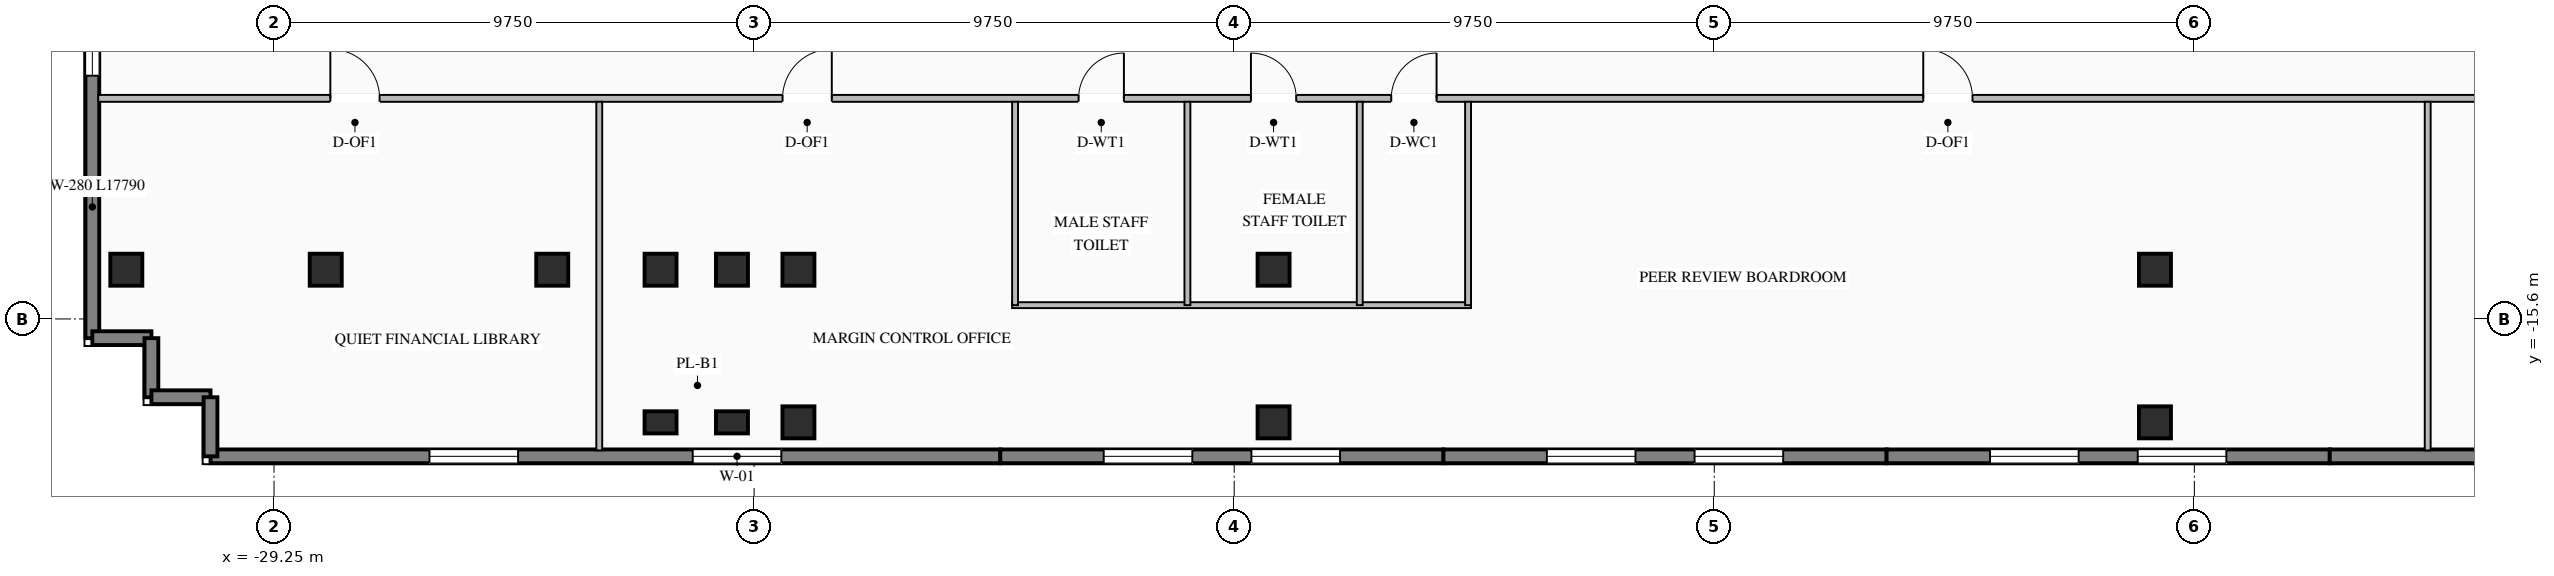
"""IFC4 building model, lengths in metres.
Left out: names, types, materials, properties, quantities, classifications, styles, units other than length and angle.
Written with IfcOpenShell. Run it as: python <this file> out.ifc"""

import sys

from ifc_helpers import new_model, si_unit, direction, frame, frame_2d, origin, origin_2d, place, context, subcontext, project, spatial, rectangle, i_section, extrude, element, fill, save


model = new_model("IFC4")
c1 = context("Model", 3, precision=1e-05, world=origin(), true_north=direction((0.0, 1.0)))
c2 = subcontext(c1, "Body", "Model", "MODEL_VIEW")
j1 = project(units=[si_unit("LENGTHUNIT", "METRE"), si_unit("PLANEANGLEUNIT", "RADIAN")], contexts=[c1])
p1 = place(None, origin())
s1 = spatial("IfcSite", under=j1, at=p1, CompositionType="ELEMENT")
p2 = place(p1, origin())
s2 = spatial("IfcBuilding", under=s1, at=p2, CompositionType="ELEMENT")
p3 = place(p2, frame((0.0, 0.0, 120.85)))
s3 = spatial("IfcBuildingStorey", under=s2, at=p3, CompositionType="ELEMENT", Elevation=120.85)
for number, where, z_axis, x_axis in (
    (1, (-21.4, -14.6, 0.0), (0.0, 0.0, 1.0), (1.0, 0.0, 0.0)),
    (2, (-19.95, -14.6, 0.0), (0.0, 0.0, 1.0), (1.0, 0.0, 0.0)),
    (3, (-18.6, -14.6, 0.0), (0.0, 0.0, 1.0), (1.0, 0.0, 0.0)),
    (4, (-8.95, -14.6, 0.0), (0.0, 0.0, 1.0), (1.0, 0.0, 0.0)),
    (5, (8.95, -14.6, 0.0), (0.0, 0.0, 1.0), (1.0, 0.0, 0.0)),
    (6, (-23.6, -14.6, 0.0), (0.0, 0.0, 1.0), (1.0, 0.0, 0.0)),
    (7, (-28.2, -14.6, 0.0), (0.0, 0.0, 1.0), (1.0, 0.0, 0.0)),
    (8, (-18.6, -17.7, 0.0), (0.0, 0.0, 1.0), (1.0, 0.0, 0.0)),
    (9, (-8.95, -17.7, 0.0), (0.0, 0.0, 1.0), (1.0, 0.0, 0.0)),
    (10, (8.95, -17.7, 0.0), (0.0, 0.0, 1.0), (1.0, 0.0, 0.0)),
    (11, (-32.25, -14.6, 0.0), (0.0, 0.0, 1.0), (1.0, 0.0, 0.0)),
):
    element("IfcColumn", number, at=place(p3, frame(where, z_axis=z_axis, x_axis=x_axis)), inside=s3, PredefinedType="COLUMN", context=c2, shape_type="SweptSolid", body=[
        extrude(i_section(OverallWidth=0.65, OverallDepth=0.65, WebThickness=0.028, FlangeThickness=0.04, at=origin_2d()), origin(), (0.0, 0.0, 1.0), 3.45),
    ])
for number, where, z_axis, x_axis in (
    (12, (-21.4, -17.7, 0.0), (0.0, 0.0, 1.0), (1.0, 0.0, 0.0)),
    (13, (-19.95, -17.7, 0.0), (0.0, 0.0, 1.0), (1.0, 0.0, 0.0)),
):
    element("IfcColumn", number, at=place(p3, frame(where, z_axis=z_axis, x_axis=x_axis)), inside=s3, PredefinedType="PILASTER", context=c2, shape_type="SweptSolid", body=[
        extrude(rectangle(XDim=0.65, YDim=0.45, at=origin_2d()), origin(), (0.0, 0.0, 1.0), 3.45),
    ])
p4 = place(p3, frame((-14.5, -18.39, 0.0), z_axis=(0.0, 0.0, 1.0), x_axis=(-1.0, 0.0, 0.0)))
e14 = element("IfcWall", 14, at=p4, inside=s3, PredefinedType="STANDARD", context=c2, shape_type="SweptSolid", body=[
    extrude(rectangle(XDim=16.04, YDim=0.28, at=frame_2d((8.02, 0.0))), origin(), (0.0, 0.0, 1.0), 3.25),
])
p5 = place(p4, frame((4.447, 0.0, 0.76)))
e15 = element("IfcOpeningElement", 15, at=p5, cuts=e14, PredefinedType="OPENING", context=c2, shape_type="SweptSolid", body=[
    extrude(rectangle(XDim=1.8, YDim=1.95, at=frame_2d((0.9, 0.975))), frame((0.0, 0.15, 0.0), z_axis=(0.0, -1.0, 0.0), x_axis=(1.0, 0.0, 0.0)), (0.0, 0.0, 1.0), 0.3),
])
p6 = place(p4, frame((9.793, 0.0, 0.76)))
e16 = element("IfcOpeningElement", 16, at=p6, cuts=e14, PredefinedType="OPENING", context=c2, shape_type="SweptSolid", body=[
    extrude(rectangle(XDim=1.8, YDim=1.95, at=frame_2d((0.9, 0.975))), frame((0.0, 0.15, 0.0), z_axis=(0.0, -1.0, 0.0), x_axis=(1.0, 0.0, 0.0)), (0.0, 0.0, 1.0), 0.3),
])
p7 = place(p3, frame((-5.5, -18.39, 0.0), z_axis=(0.0, 0.0, 1.0), x_axis=(-1.0, 0.0, 0.0)))
e17 = element("IfcWall", 17, at=p7, inside=s3, PredefinedType="STANDARD", context=c2, shape_type="SweptSolid", body=[
    extrude(rectangle(XDim=9.0, YDim=0.28, at=frame_2d((4.5, 0.0))), origin(), (0.0, 0.0, 1.0), 3.25),
])
p8 = place(p7, frame((2.1, 0.0, 0.76)))
e18 = element("IfcOpeningElement", 18, at=p8, cuts=e17, PredefinedType="OPENING", context=c2, shape_type="SweptSolid", body=[
    extrude(rectangle(XDim=1.8, YDim=1.95, at=frame_2d((0.9, 0.975))), frame((0.0, 0.15, 0.0), z_axis=(0.0, -1.0, 0.0), x_axis=(1.0, 0.0, 0.0)), (0.0, 0.0, 1.0), 0.3),
])
p9 = place(p7, frame((5.1, 0.0, 0.76)))
e19 = element("IfcOpeningElement", 19, at=p9, cuts=e17, PredefinedType="OPENING", context=c2, shape_type="SweptSolid", body=[
    extrude(rectangle(XDim=1.8, YDim=1.95, at=frame_2d((0.9, 0.975))), frame((0.0, 0.15, 0.0), z_axis=(0.0, -1.0, 0.0), x_axis=(1.0, 0.0, 0.0)), (0.0, 0.0, 1.0), 0.3),
])
p10 = place(p3, frame((3.5, -18.39, 0.0), z_axis=(0.0, 0.0, 1.0), x_axis=(-1.0, 0.0, 0.0)))
e20 = element("IfcWall", 20, at=p10, inside=s3, PredefinedType="STANDARD", context=c2, shape_type="SweptSolid", body=[
    extrude(rectangle(XDim=9.0, YDim=0.28, at=frame_2d((4.5, 0.0))), origin(), (0.0, 0.0, 1.0), 3.25),
])
p11 = place(p10, frame((2.1, 0.0, 0.76)))
e21 = element("IfcOpeningElement", 21, at=p11, cuts=e20, PredefinedType="OPENING", context=c2, shape_type="SweptSolid", body=[
    extrude(rectangle(XDim=1.8, YDim=1.95, at=frame_2d((0.9, 0.975))), frame((0.0, 0.15, 0.0), z_axis=(0.0, -1.0, 0.0), x_axis=(1.0, 0.0, 0.0)), (0.0, 0.0, 1.0), 0.3),
])
p12 = place(p10, frame((5.1, 0.0, 0.76)))
e22 = element("IfcOpeningElement", 22, at=p12, cuts=e20, PredefinedType="OPENING", context=c2, shape_type="SweptSolid", body=[
    extrude(rectangle(XDim=1.8, YDim=1.95, at=frame_2d((0.9, 0.975))), frame((0.0, 0.15, 0.0), z_axis=(0.0, -1.0, 0.0), x_axis=(1.0, 0.0, 0.0)), (0.0, 0.0, 1.0), 0.3),
])
p13 = place(p3, frame((12.5, -18.39, 0.0), z_axis=(0.0, 0.0, 1.0), x_axis=(-1.0, 0.0, 0.0)))
e23 = element("IfcWall", 23, at=p13, inside=s3, PredefinedType="STANDARD", context=c2, shape_type="SweptSolid", body=[
    extrude(rectangle(XDim=9.0, YDim=0.28, at=frame_2d((4.5, 0.0))), origin(), (0.0, 0.0, 1.0), 3.25),
])
p14 = place(p13, frame((2.1, 0.0, 0.76)))
e24 = element("IfcOpeningElement", 24, at=p14, cuts=e23, PredefinedType="OPENING", context=c2, shape_type="SweptSolid", body=[
    extrude(rectangle(XDim=1.8, YDim=1.95, at=frame_2d((0.9, 0.975))), frame((0.0, 0.15, 0.0), z_axis=(0.0, -1.0, 0.0), x_axis=(1.0, 0.0, 0.0)), (0.0, 0.0, 1.0), 0.3),
])
p15 = place(p13, frame((5.1, 0.0, 0.76)))
e25 = element("IfcOpeningElement", 25, at=p15, cuts=e23, PredefinedType="OPENING", context=c2, shape_type="SweptSolid", body=[
    extrude(rectangle(XDim=1.8, YDim=1.95, at=frame_2d((0.9, 0.975))), frame((0.0, 0.15, 0.0), z_axis=(0.0, -1.0, 0.0), x_axis=(1.0, 0.0, 0.0)), (0.0, 0.0, 1.0), 0.3),
])
p16 = place(p3, frame((28.54, -18.39, 0.0), z_axis=(0.0, 0.0, 1.0), x_axis=(-1.0, 0.0, 0.0)))
e26 = element("IfcWall", 26, at=p16, inside=s3, PredefinedType="STANDARD", context=c2, shape_type="SweptSolid", body=[
    extrude(rectangle(XDim=16.04, YDim=0.28, at=frame_2d((8.02, 0.0))), origin(), (0.0, 0.0, 1.0), 3.25),
])
p17 = place(p16, frame((4.447, 0.0, 0.76)))
e27 = element("IfcOpeningElement", 27, at=p17, cuts=e26, PredefinedType="OPENING", context=c2, shape_type="SweptSolid", body=[
    extrude(rectangle(XDim=1.8, YDim=1.95, at=frame_2d((0.9, 0.975))), frame((0.0, 0.15, 0.0), z_axis=(0.0, -1.0, 0.0), x_axis=(1.0, 0.0, 0.0)), (0.0, 0.0, 1.0), 0.3),
])
p18 = place(p16, frame((9.793, 0.0, 0.76)))
e28 = element("IfcOpeningElement", 28, at=p18, cuts=e26, PredefinedType="OPENING", context=c2, shape_type="SweptSolid", body=[
    extrude(rectangle(XDim=1.8, YDim=1.95, at=frame_2d((0.9, 0.975))), frame((0.0, 0.15, 0.0), z_axis=(0.0, -1.0, 0.0), x_axis=(1.0, 0.0, 0.0)), (0.0, 0.0, 1.0), 0.3),
])
p19 = place(p3, frame((-32.94, -15.99, 0.0), z_axis=(0.0, 0.0, 1.0), x_axis=(0.0, 1.0, 0.0)))
e29 = element("IfcWall", 29, at=p19, inside=s3, PredefinedType="STANDARD", context=c2, shape_type="SweptSolid", body=[
    extrude(rectangle(XDim=17.79, YDim=0.28, at=frame_2d((8.895, 0.0))), origin(), (0.0, 0.0, 1.0), 3.25),
])
p20 = place(p19, frame((5.33, 0.0, 0.76)))
e30 = element("IfcOpeningElement", 30, at=p20, cuts=e29, PredefinedType="OPENING", context=c2, shape_type="SweptSolid", body=[
    extrude(rectangle(XDim=1.2, YDim=1.95, at=frame_2d((0.6, 0.975))), frame((0.0, 0.15, 0.0), z_axis=(0.0, -1.0, 0.0), x_axis=(1.0, 0.0, 0.0)), (0.0, 0.0, 1.0), 0.3),
])
p21 = place(p19, frame((11.26, 0.0, 0.76)))
e31 = element("IfcOpeningElement", 31, at=p21, cuts=e29, PredefinedType="OPENING", context=c2, shape_type="SweptSolid", body=[
    extrude(rectangle(XDim=1.2, YDim=1.95, at=frame_2d((0.6, 0.975))), frame((0.0, 0.15, 0.0), z_axis=(0.0, -1.0, 0.0), x_axis=(1.0, 0.0, 0.0)), (0.0, 0.0, 1.0), 0.3),
])
for number, where, z_axis, x_axis in (
    (32, (-32.94, -15.99, 0.0), (0.0, 0.0, 1.0), (1.0, 0.0, 0.0)),
    (33, (-31.74, -15.99, 0.0), (0.0, 0.0, 1.0), (0.0, -1.0, 0.0)),
    (34, (-31.74, -17.19, 0.0), (0.0, 0.0, 1.0), (1.0, 0.0, 0.0)),
    (35, (-30.54, -17.19, 0.0), (0.0, 0.0, 1.0), (0.0, -1.0, 0.0)),
):
    element("IfcWall", number, at=place(p3, frame(where, z_axis=z_axis, x_axis=x_axis)), inside=s3, PredefinedType="STANDARD", context=c2, shape_type="SweptSolid", body=[
        extrude(rectangle(XDim=1.2, YDim=0.28, at=frame_2d((0.6, 0.0))), origin(), (0.0, 0.0, 1.0), 3.25),
    ])
p22 = place(p3, frame((-32.82, -11.12, 0.0), z_axis=(0.0, 0.0, 1.0), x_axis=(1.0, 0.0, 0.0)))
e36 = element("IfcWall", 36, at=p22, inside=s3, PredefinedType="STANDARD", context=c2, shape_type="SweptSolid", body=[
    extrude(rectangle(XDim=63.64, YDim=0.14, at=frame_2d((31.82, 0.0))), origin(), (0.0, 0.0, 1.0), 3.25),
])
p23 = place(p22, frame((19.91, 0.0, 0.0)))
e37 = element("IfcOpeningElement", 37, at=p23, cuts=e36, PredefinedType="OPENING", context=c2, shape_type="SweptSolid", body=[
    extrude(rectangle(XDim=0.92, YDim=2.08, at=frame_2d((0.46, 1.04))), frame((0.0, 0.08, 0.0), z_axis=(0.0, -1.0, 0.0), x_axis=(1.0, 0.0, 0.0)), (0.0, 0.0, 1.0), 0.16),
])
p24 = place(p22, frame((23.41, 0.0, 0.0)))
e38 = element("IfcOpeningElement", 38, at=p24, cuts=e36, PredefinedType="OPENING", context=c2, shape_type="SweptSolid", body=[
    extrude(rectangle(XDim=0.92, YDim=2.08, at=frame_2d((0.46, 1.04))), frame((0.0, 0.08, 0.0), z_axis=(0.0, -1.0, 0.0), x_axis=(1.0, 0.0, 0.0)), (0.0, 0.0, 1.0), 0.16),
])
p25 = place(p22, frame((26.26, 0.0, 0.0)))
e39 = element("IfcOpeningElement", 39, at=p25, cuts=e36, PredefinedType="OPENING", context=c2, shape_type="SweptSolid", body=[
    extrude(rectangle(XDim=0.92, YDim=2.08, at=frame_2d((0.46, 1.04))), frame((0.0, 0.08, 0.0), z_axis=(0.0, -1.0, 0.0), x_axis=(1.0, 0.0, 0.0)), (0.0, 0.0, 1.0), 0.16),
])
p26 = place(p22, frame((4.713, 0.0, 0.0)))
e40 = element("IfcOpeningElement", 40, at=p26, cuts=e36, PredefinedType="OPENING", context=c2, shape_type="SweptSolid", body=[
    extrude(rectangle(XDim=1.0, YDim=2.08, at=frame_2d((0.5, 1.04))), frame((0.0, 0.08, 0.0), z_axis=(0.0, -1.0, 0.0), x_axis=(1.0, 0.0, 0.0)), (0.0, 0.0, 1.0), 0.16),
])
p27 = place(p22, frame((13.897, 0.0, 0.0)))
e41 = element("IfcOpeningElement", 41, at=p27, cuts=e36, PredefinedType="OPENING", context=c2, shape_type="SweptSolid", body=[
    extrude(rectangle(XDim=1.0, YDim=2.08, at=frame_2d((0.5, 1.04))), frame((0.0, 0.08, 0.0), z_axis=(0.0, -1.0, 0.0), x_axis=(1.0, 0.0, 0.0)), (0.0, 0.0, 1.0), 0.16),
])
p28 = place(p22, frame((37.064, 0.0, 0.0)))
e42 = element("IfcOpeningElement", 42, at=p28, cuts=e36, PredefinedType="OPENING", context=c2, shape_type="SweptSolid", body=[
    extrude(rectangle(XDim=1.0, YDim=2.08, at=frame_2d((0.5, 1.04))), frame((0.0, 0.08, 0.0), z_axis=(0.0, -1.0, 0.0), x_axis=(1.0, 0.0, 0.0)), (0.0, 0.0, 1.0), 0.16),
])
p29 = place(p22, frame((54.848, 0.0, 0.0)))
e43 = element("IfcOpeningElement", 43, at=p29, cuts=e36, PredefinedType="OPENING", context=c2, shape_type="SweptSolid", body=[
    extrude(rectangle(XDim=1.0, YDim=2.08, at=frame_2d((0.5, 1.04))), frame((0.0, 0.08, 0.0), z_axis=(0.0, -1.0, 0.0), x_axis=(1.0, 0.0, 0.0)), (0.0, 0.0, 1.0), 0.16),
])
p30 = place(p3, frame((-14.26, -15.32, 0.0), z_axis=(0.0, 0.0, 1.0), x_axis=(1.0, 0.0, 0.0)))
e44 = element("IfcWall", 44, at=p30, inside=s3, PredefinedType="STANDARD", context=c2, shape_type="SweptSolid", body=[
    extrude(rectangle(XDim=9.32, YDim=0.12, at=frame_2d((4.66, 0.0))), origin(), (0.0, 0.0, 1.0), 3.25),
])
for number, where, z_axis, x_axis in (
    (45, (-14.2, -15.32, 0.0), (0.0, 0.0, 1.0), (0.0, 1.0, 0.0)),
    (46, (-10.7, -15.32, 0.0), (0.0, 0.0, 1.0), (0.0, 1.0, 0.0)),
    (47, (-7.2, -15.32, 0.0), (0.0, 0.0, 1.0), (0.0, 1.0, 0.0)),
    (48, (-5.0, -15.32, 0.0), (0.0, 0.0, 1.0), (0.0, 1.0, 0.0)),
):
    element("IfcWall", number, at=place(p3, frame(where, z_axis=z_axis, x_axis=x_axis)), inside=s3, PredefinedType="STANDARD", context=c2, shape_type="SweptSolid", body=[
        extrude(rectangle(XDim=4.13, YDim=0.12, at=frame_2d((2.065, 0.0))), origin(), (0.0, 0.0, 1.0), 3.25),
    ])
for number, where, z_axis, x_axis in (
    (49, (-22.645, -18.27, 0.0), (0.0, 0.0, 1.0), (0.0, 1.0, 0.0)),
    (50, (14.489, -18.27, 0.0), (0.0, 0.0, 1.0), (0.0, 1.0, 0.0)),
):
    element("IfcWall", number, at=place(p3, frame(where, z_axis=z_axis, x_axis=x_axis)), inside=s3, PredefinedType="STANDARD", context=c2, shape_type="SweptSolid", body=[
        extrude(rectangle(XDim=7.08, YDim=0.12, at=frame_2d((3.54, 0.0))), origin(), (0.0, 0.0, 1.0), 3.25),
    ])
p31 = place(p5, origin())
e51 = element("IfcWindow", 51, at=p31, inside=s3, PartitioningType="SINGLE_PANEL", PredefinedType="WINDOW", context=c2, shape_type="SweptSolid", body=[
    extrude(rectangle(XDim=1.8, YDim=1.95, at=frame_2d((0.9, 0.975))), frame((0.0, 0.03, 0.0), z_axis=(0.0, -1.0, 0.0), x_axis=(1.0, 0.0, 0.0)), (0.0, 0.0, 1.0), 0.06),
])
fill(e15, e51)
p32 = place(p6, origin())
e52 = element("IfcWindow", 52, at=p32, inside=s3, PartitioningType="SINGLE_PANEL", PredefinedType="WINDOW", context=c2, shape_type="SweptSolid", body=[
    extrude(rectangle(XDim=1.8, YDim=1.95, at=frame_2d((0.9, 0.975))), frame((0.0, 0.03, 0.0), z_axis=(0.0, -1.0, 0.0), x_axis=(1.0, 0.0, 0.0)), (0.0, 0.0, 1.0), 0.06),
])
fill(e16, e52)
p33 = place(p8, origin())
e53 = element("IfcWindow", 53, at=p33, inside=s3, PartitioningType="SINGLE_PANEL", PredefinedType="WINDOW", context=c2, shape_type="SweptSolid", body=[
    extrude(rectangle(XDim=1.8, YDim=1.95, at=frame_2d((0.9, 0.975))), frame((0.0, 0.03, 0.0), z_axis=(0.0, -1.0, 0.0), x_axis=(1.0, 0.0, 0.0)), (0.0, 0.0, 1.0), 0.06),
])
fill(e18, e53)
p34 = place(p9, origin())
e54 = element("IfcWindow", 54, at=p34, inside=s3, PartitioningType="SINGLE_PANEL", PredefinedType="WINDOW", context=c2, shape_type="SweptSolid", body=[
    extrude(rectangle(XDim=1.8, YDim=1.95, at=frame_2d((0.9, 0.975))), frame((0.0, 0.03, 0.0), z_axis=(0.0, -1.0, 0.0), x_axis=(1.0, 0.0, 0.0)), (0.0, 0.0, 1.0), 0.06),
])
fill(e19, e54)
p35 = place(p11, origin())
e55 = element("IfcWindow", 55, at=p35, inside=s3, PartitioningType="SINGLE_PANEL", PredefinedType="WINDOW", context=c2, shape_type="SweptSolid", body=[
    extrude(rectangle(XDim=1.8, YDim=1.95, at=frame_2d((0.9, 0.975))), frame((0.0, 0.03, 0.0), z_axis=(0.0, -1.0, 0.0), x_axis=(1.0, 0.0, 0.0)), (0.0, 0.0, 1.0), 0.06),
])
fill(e21, e55)
p36 = place(p12, origin())
e56 = element("IfcWindow", 56, at=p36, inside=s3, PartitioningType="SINGLE_PANEL", PredefinedType="WINDOW", context=c2, shape_type="SweptSolid", body=[
    extrude(rectangle(XDim=1.8, YDim=1.95, at=frame_2d((0.9, 0.975))), frame((0.0, 0.03, 0.0), z_axis=(0.0, -1.0, 0.0), x_axis=(1.0, 0.0, 0.0)), (0.0, 0.0, 1.0), 0.06),
])
fill(e22, e56)
p37 = place(p14, origin())
e57 = element("IfcWindow", 57, at=p37, inside=s3, PartitioningType="SINGLE_PANEL", PredefinedType="WINDOW", context=c2, shape_type="SweptSolid", body=[
    extrude(rectangle(XDim=1.8, YDim=1.95, at=frame_2d((0.9, 0.975))), frame((0.0, 0.03, 0.0), z_axis=(0.0, -1.0, 0.0), x_axis=(1.0, 0.0, 0.0)), (0.0, 0.0, 1.0), 0.06),
])
fill(e24, e57)
p38 = place(p15, origin())
e58 = element("IfcWindow", 58, at=p38, inside=s3, PartitioningType="SINGLE_PANEL", PredefinedType="WINDOW", context=c2, shape_type="SweptSolid", body=[
    extrude(rectangle(XDim=1.8, YDim=1.95, at=frame_2d((0.9, 0.975))), frame((0.0, 0.03, 0.0), z_axis=(0.0, -1.0, 0.0), x_axis=(1.0, 0.0, 0.0)), (0.0, 0.0, 1.0), 0.06),
])
fill(e25, e58)
p39 = place(p20, origin())
e59 = element("IfcWindow", 59, at=p39, inside=s3, PartitioningType="SINGLE_PANEL", PredefinedType="WINDOW", context=c2, shape_type="SweptSolid", body=[
    extrude(rectangle(XDim=1.2, YDim=1.95, at=frame_2d((0.6, 0.975))), frame((0.0, 0.03, 0.0), z_axis=(0.0, -1.0, 0.0), x_axis=(1.0, 0.0, 0.0)), (0.0, 0.0, 1.0), 0.06),
])
fill(e30, e59)
p40 = place(p23, origin())
e60 = element("IfcDoor", 60, at=p40, inside=s3, OperationType="SINGLE_SWING_RIGHT", PredefinedType="DOOR", context=c2, shape_type="SweptSolid", body=[
    extrude(rectangle(XDim=0.92, YDim=2.08, at=frame_2d((0.46, 1.04))), frame((0.0, 0.025, 0.0), z_axis=(0.0, -1.0, 0.0), x_axis=(1.0, 0.0, 0.0)), (0.0, 0.0, 1.0), 0.05),
])
fill(e37, e60)
p41 = place(p24, origin())
e61 = element("IfcDoor", 61, at=p41, inside=s3, OperationType="SINGLE_SWING_LEFT", PredefinedType="DOOR", context=c2, shape_type="SweptSolid", body=[
    extrude(rectangle(XDim=0.92, YDim=2.08, at=frame_2d((0.46, 1.04))), frame((0.0, 0.025, 0.0), z_axis=(0.0, -1.0, 0.0), x_axis=(1.0, 0.0, 0.0)), (0.0, 0.0, 1.0), 0.05),
])
fill(e38, e61)
p42 = place(p25, origin())
e62 = element("IfcDoor", 62, at=p42, inside=s3, OperationType="SINGLE_SWING_RIGHT", PredefinedType="DOOR", context=c2, shape_type="SweptSolid", body=[
    extrude(rectangle(XDim=0.92, YDim=2.08, at=frame_2d((0.46, 1.04))), frame((0.0, 0.025, 0.0), z_axis=(0.0, -1.0, 0.0), x_axis=(1.0, 0.0, 0.0)), (0.0, 0.0, 1.0), 0.05),
])
fill(e39, e62)
p43 = place(p26, origin())
e63 = element("IfcDoor", 63, at=p43, inside=s3, OperationType="SINGLE_SWING_LEFT", PredefinedType="DOOR", context=c2, shape_type="SweptSolid", body=[
    extrude(rectangle(XDim=1.0, YDim=2.08, at=frame_2d((0.5, 1.04))), frame((0.0, 0.025, 0.0), z_axis=(0.0, -1.0, 0.0), x_axis=(1.0, 0.0, 0.0)), (0.0, 0.0, 1.0), 0.05),
])
fill(e40, e63)
p44 = place(p27, origin())
e64 = element("IfcDoor", 64, at=p44, inside=s3, OperationType="SINGLE_SWING_RIGHT", PredefinedType="DOOR", context=c2, shape_type="SweptSolid", body=[
    extrude(rectangle(XDim=1.0, YDim=2.08, at=frame_2d((0.5, 1.04))), frame((0.0, 0.025, 0.0), z_axis=(0.0, -1.0, 0.0), x_axis=(1.0, 0.0, 0.0)), (0.0, 0.0, 1.0), 0.05),
])
fill(e41, e64)
p45 = place(p28, origin())
e65 = element("IfcDoor", 65, at=p45, inside=s3, OperationType="SINGLE_SWING_LEFT", PredefinedType="DOOR", context=c2, shape_type="SweptSolid", body=[
    extrude(rectangle(XDim=1.0, YDim=2.08, at=frame_2d((0.5, 1.04))), frame((0.0, 0.025, 0.0), z_axis=(0.0, -1.0, 0.0), x_axis=(1.0, 0.0, 0.0)), (0.0, 0.0, 1.0), 0.05),
])
fill(e42, e65)
save(model, sys.argv[1])
